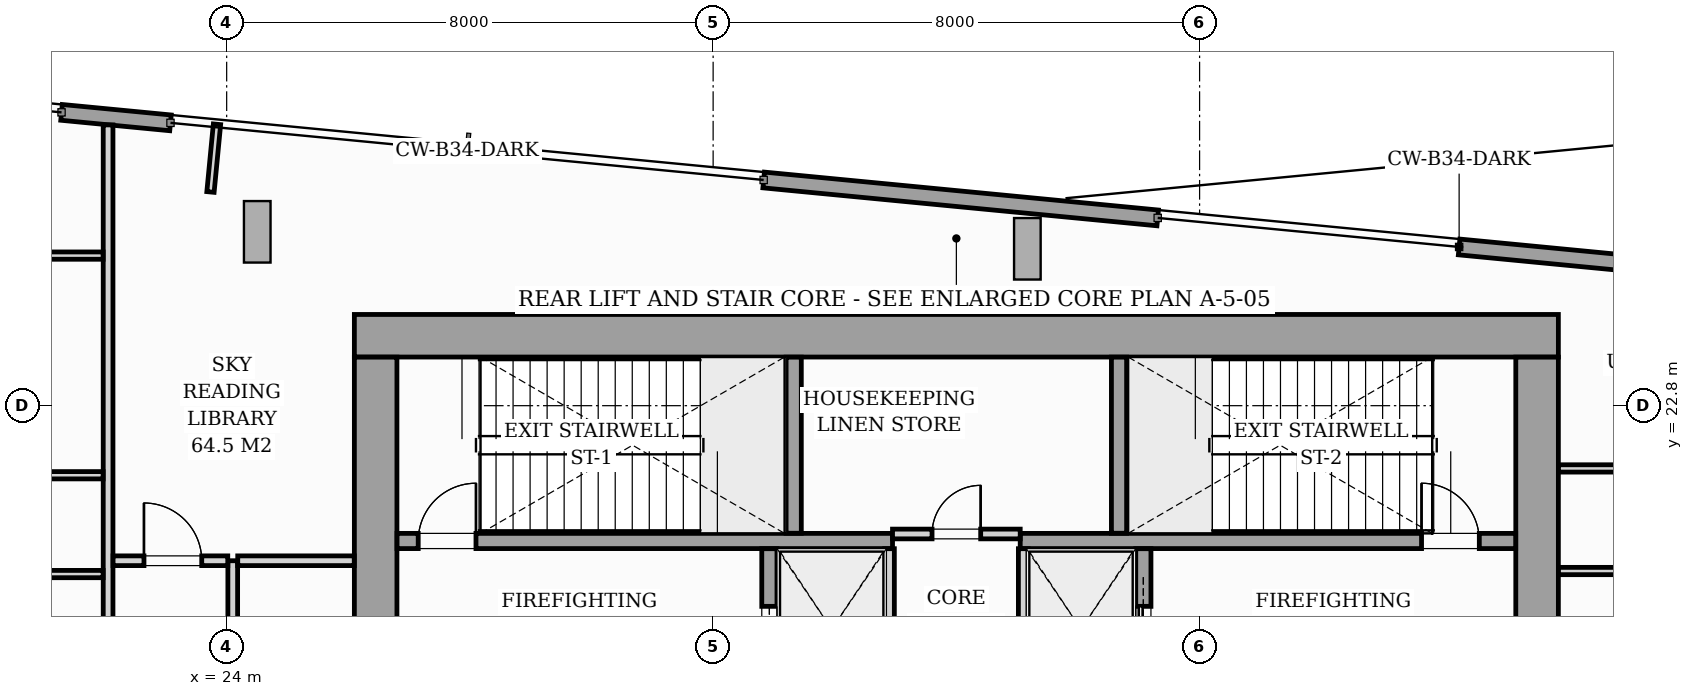
"""IFC4 building model, lengths in metres.
Left out: names, types, materials, properties, quantities, classifications, styles, units other than length and angle.
Written with IfcOpenShell. Run it as: python <this file> out.ifc"""

import sys

from ifc_helpers import new_model, si_unit, direction, frame, frame_2d, origin, origin_2d, place, context, subcontext, project, spatial, rectangle, i_section, extrude, source, transform, mapped, element, fill, save


model = new_model("IFC4")
c1 = context("Model", 3, precision=1e-05, world=origin(), true_north=direction((0.0, 1.0)))
c2 = subcontext(c1, "Body", "Model", "MODEL_VIEW")
j1 = project(units=[si_unit("LENGTHUNIT", "METRE"), si_unit("PLANEANGLEUNIT", "RADIAN")], contexts=[c1])
p1 = place(None, origin())
s1 = spatial("IfcSite", under=j1, at=p1, CompositionType="ELEMENT")
p2 = place(p1, origin())
s2 = spatial("IfcBuilding", under=s1, at=p2, CompositionType="ELEMENT")
p3 = place(p2, frame((0.0, 0.0, 119.4)))
s3 = spatial("IfcBuildingStorey", under=s2, at=p3, CompositionType="ELEMENT", Elevation=119.4)
m1 = source(origin(), c2, "Body", "SweptSolid", [
    extrude(i_section(OverallWidth=0.421, OverallDepth=0.465, WebThickness=0.045, FlangeThickness=0.073, FilletRadius=0.018, at=origin_2d()), origin(), (0.0, 0.0, 1.0), 5.196),
])
for number, where, z_axis, x_axis in (
    (1, (26.4, 24.0, 0.002), (0.0, 0.0, 1.0), (1.0, 0.0, 0.0)),
    (2, (33.12, 24.0, 0.002), (0.0, 0.0, 1.0), (1.0, 0.0, 0.0)),
    (3, (38.88, 24.0, 0.002), (0.0, 0.0, 1.0), (1.0, 0.0, 0.0)),
    (4, (45.6, 24.0, 0.002), (0.0, 0.0, 1.0), (1.0, 0.0, 0.0)),
):
    element("IfcColumn", number, at=place(p3, frame(where, z_axis=z_axis, x_axis=x_axis)), inside=s3, PredefinedType="PILASTER", context=c2, shape_type="MappedRepresentation", body=[
        mapped(m1, transform((0.0, 0.0, 0.0), scale=1.0)),
    ])
m2 = source(origin(), c2, "Body", "SweptSolid", [
    extrude(i_section(OverallWidth=0.438, OverallDepth=1.011, WebThickness=0.041, FlangeThickness=0.074, FilletRadius=0.024, at=origin_2d()), origin(), (0.0, 0.0, 1.0), 5.536),
])
p4 = place(p3, frame((25.221, 25.412, 0.139), z_axis=(-0.550407983816, 0.189202744437, 0.813174872244), x_axis=(0.769008579573, -0.264346699228, 0.582019438809)))
e5 = element("IfcColumn", 5, at=p4, inside=s3, PredefinedType="COLUMN", context=c2, shape_type="MappedRepresentation", body=[
    mapped(m2, transform((0.0, 0.0, 0.0), scale=1.0)),
])
m3 = source(origin(), c2, "Body", "SweptSolid", [
    extrude(i_section(OverallWidth=0.438, OverallDepth=1.011, WebThickness=0.041, FlangeThickness=0.074, FilletRadius=0.024, at=origin_2d()), origin(), (0.0, 0.0, 1.0), 6.257),
])
p5 = place(p3, frame((38.191, 25.38, 0.166), z_axis=(-0.703272609658, 7.8037351e-05, 0.710920270083), x_axis=(0.710920265706, -7.8885959e-05, 0.703272613988)))
e6 = element("IfcColumn", 6, at=p5, inside=s3, PredefinedType="COLUMN", context=c2, shape_type="MappedRepresentation", body=[
    mapped(m3, transform((0.0, 0.0, 0.0), scale=1.0)),
])
m4 = source(origin(), c2, "Body", "SweptSolid", [
    extrude(i_section(OverallWidth=0.438, OverallDepth=1.011, WebThickness=0.041, FlangeThickness=0.074, FilletRadius=0.024, at=origin_2d()), origin(), (0.0, 0.0, 1.0), 7.288),
])
p6 = place(p3, frame((51.152, 26.298, 0.186), z_axis=(-0.787175284288, -0.120828173558, 0.604777334463), x_axis=(0.597776232885, 0.091756196945, 0.796394610554)))
e7 = element("IfcColumn", 7, at=p6, inside=s3, PredefinedType="COLUMN", context=c2, shape_type="MappedRepresentation", body=[
    mapped(m4, transform((0.0, 0.0, 0.0), scale=1.0)),
])
p7 = place(p3, frame((21.284, 27.624, 0.0), z_axis=(0.0, 0.0, 1.0), x_axis=(0.995391866735, -0.09589072759, 0.0)))
e8 = element("IfcWall", 8, at=p7, inside=s3, PredefinedType="STANDARD", context=c2, shape_type="SweptSolid", body=[
    extrude(rectangle(XDim=1.8, YDim=0.26, at=frame_2d((0.9, 0.0))), origin(), (0.0, 0.0, 1.0), 4.78),
])
p8 = place(p3, frame((32.831, 26.512, 0.0), z_axis=(0.0, 0.0, 1.0), x_axis=(0.995395138946, -0.095856754395, 0.0)))
e9 = element("IfcWall", 9, at=p8, inside=s3, PredefinedType="STANDARD", context=c2, shape_type="SweptSolid", body=[
    extrude(rectangle(XDim=6.51, YDim=0.26, at=frame_2d((3.255, 0.0))), origin(), (0.0, 0.0, 1.0), 4.78),
])
p9 = place(p3, frame((44.268, 25.41, 0.0), z_axis=(0.0, 0.0, 1.0), x_axis=(0.995396292684, -0.095844772998, 0.0)))
e10 = element("IfcWall", 10, at=p9, inside=s3, PredefinedType="STANDARD", context=c2, shape_type="SweptSolid", body=[
    extrude(rectangle(XDim=4.85, YDim=0.26, at=frame_2d((2.425, 0.0))), origin(), (0.0, 0.0, 1.0), 4.78),
])
p10 = place(p3, frame((26.1, 23.95, 0.0), z_axis=(0.0, 0.0, 1.0), x_axis=(1.0, 0.0, 0.0)))
e11 = element("IfcWall", 11, at=p10, inside=s3, PredefinedType="SHEAR", context=c2, shape_type="SweptSolid", body=[
    extrude(rectangle(XDim=19.8, YDim=0.7, at=frame_2d((9.9, 0.0))), origin(), (0.0, 0.0, 1.0), 5.2),
])
for number, where, z_axis, x_axis in (
    (12, (26.45, 17.802, 0.0), (0.0, 0.0, 1.0), (0.0, 1.0, 0.0)),
    (13, (45.55, 17.802, 0.0), (0.0, 0.0, 1.0), (0.0, 1.0, 0.0)),
):
    element("IfcWall", number, at=place(p3, frame(where, z_axis=z_axis, x_axis=x_axis)), inside=s3, PredefinedType="SHEAR", context=c2, shape_type="SweptSolid", body=[
        extrude(rectangle(XDim=5.796, YDim=0.7, at=frame_2d((2.898, 0.0))), origin(), (0.0, 0.0, 1.0), 5.2),
    ])
p11 = place(p3, frame((26.802, 20.575, 0.0), z_axis=(0.0, 0.0, 1.0), x_axis=(1.0, 0.0, 0.0)))
e14 = element("IfcWall", 14, at=p11, inside=s3, PredefinedType="SOLIDWALL", context=c2, shape_type="SweptSolid", body=[
    extrude(rectangle(XDim=8.148, YDim=0.25, at=frame_2d((4.074, 0.0))), origin(), (0.0, 0.0, 1.0), 5.2),
])
p12 = place(p11, frame((0.348, 0.0, 0.0)))
e15 = element("IfcOpeningElement", 15, at=p12, cuts=e14, PredefinedType="OPENING", context=c2, shape_type="SweptSolid", body=[
    extrude(rectangle(XDim=0.95, YDim=2.06, at=frame_2d((0.475, 1.03))), frame((0.0, 0.135, 0.0), z_axis=(0.0, -1.0, 0.0), x_axis=(1.0, 0.0, 0.0)), (0.0, 0.0, 1.0), 0.27),
])
p13 = place(p3, frame((37.05, 20.575, 0.0), z_axis=(0.0, 0.0, 1.0), x_axis=(1.0, 0.0, 0.0)))
e16 = element("IfcWall", 16, at=p13, inside=s3, PredefinedType="SOLIDWALL", context=c2, shape_type="SweptSolid", body=[
    extrude(rectangle(XDim=8.148, YDim=0.25, at=frame_2d((4.074, 0.0))), origin(), (0.0, 0.0, 1.0), 5.2),
])
p14 = place(p13, frame((6.6, 0.0, 0.0)))
e17 = element("IfcOpeningElement", 17, at=p14, cuts=e16, PredefinedType="OPENING", context=c2, shape_type="SweptSolid", body=[
    extrude(rectangle(XDim=0.95, YDim=2.06, at=frame_2d((0.475, 1.03))), frame((0.0, 0.135, 0.0), z_axis=(0.0, -1.0, 0.0), x_axis=(1.0, 0.0, 0.0)), (0.0, 0.0, 1.0), 0.27),
])
for number, where, z_axis, x_axis in (
    (18, (33.325, 20.702, 0.0), (0.0, 0.0, 1.0), (0.0, 1.0, 0.0)),
    (19, (38.675, 20.702, 0.0), (0.0, 0.0, 1.0), (0.0, 1.0, 0.0)),
):
    element("IfcWall", number, at=place(p3, frame(where, z_axis=z_axis, x_axis=x_axis)), inside=s3, PredefinedType="SOLIDWALL", context=c2, shape_type="SweptSolid", body=[
        extrude(rectangle(XDim=2.896, YDim=0.25, at=frame_2d((1.448, 0.0))), origin(), (0.0, 0.0, 1.0), 5.2),
    ])
p15 = place(p3, frame((32.925, 17.802, 0.0), z_axis=(0.0, 0.0, 1.0), x_axis=(0.0, 1.0, 0.0)))
e20 = element("IfcWall", 20, at=p15, inside=s3, PredefinedType="SOLIDWALL", context=c2, shape_type="SweptSolid", body=[
    extrude(rectangle(XDim=2.646, YDim=0.25, at=frame_2d((1.323, 0.0))), origin(), (0.0, 0.0, 1.0), 5.2),
])
p16 = place(p15, frame((0.598, 0.0, 0.0)))
e21 = element("IfcOpeningElement", 21, at=p16, cuts=e20, PredefinedType="OPENING", context=c2, shape_type="SweptSolid", body=[
    extrude(rectangle(XDim=1.1, YDim=2.08, at=frame_2d((0.55, 1.04))), frame((0.0, 0.135, 0.0), z_axis=(0.0, -1.0, 0.0), x_axis=(1.0, 0.0, 0.0)), (0.0, 0.0, 1.0), 0.27),
])
for number, where, z_axis, x_axis in (
    (22, (34.9, 17.802, 0.0), (0.0, 0.0, 1.0), (0.0, 1.0, 0.0)),
    (23, (37.1, 17.802, 0.0), (0.0, 0.0, 1.0), (0.0, 1.0, 0.0)),
):
    element("IfcWall", number, at=place(p3, frame(where, z_axis=z_axis, x_axis=x_axis)), inside=s3, PredefinedType="PARTITIONING", context=c2, shape_type="SweptSolid", body=[
        extrude(rectangle(XDim=2.646, YDim=0.16, at=frame_2d((1.323, 0.0))), origin(), (0.0, 0.0, 1.0), 4.78),
    ])
p17 = place(p3, frame((39.075, 17.802, 0.0), z_axis=(0.0, 0.0, 1.0), x_axis=(0.0, 1.0, 0.0)))
e24 = element("IfcWall", 24, at=p17, inside=s3, PredefinedType="SOLIDWALL", context=c2, shape_type="SweptSolid", body=[
    extrude(rectangle(XDim=2.646, YDim=0.25, at=frame_2d((1.323, 0.0))), origin(), (0.0, 0.0, 1.0), 5.2),
])
p18 = place(p17, frame((0.598, 0.0, 0.0)))
e25 = element("IfcOpeningElement", 25, at=p18, cuts=e24, PredefinedType="OPENING", context=c2, shape_type="SweptSolid", body=[
    extrude(rectangle(XDim=1.1, YDim=2.08, at=frame_2d((0.55, 1.04))), frame((0.0, 0.135, 0.0), z_axis=(0.0, -1.0, 0.0), x_axis=(1.0, 0.0, 0.0)), (0.0, 0.0, 1.0), 0.27),
])
p19 = place(p3, frame((34.95, 20.69, 0.0), z_axis=(0.0, 0.0, 1.0), x_axis=(1.0, 0.0, 0.0)))
e26 = element("IfcWall", 26, at=p19, inside=s3, PredefinedType="PARTITIONING", context=c2, shape_type="SweptSolid", body=[
    extrude(rectangle(XDim=2.1, YDim=0.16, at=frame_2d((1.05, 0.0))), origin(), (0.0, 0.0, 1.0), 4.78),
])
p20 = place(p19, frame((0.65, 0.0, 0.0)))
e27 = element("IfcOpeningElement", 27, at=p20, cuts=e26, PredefinedType="OPENING", context=c2, shape_type="SweptSolid", body=[
    extrude(rectangle(XDim=0.8, YDim=2.05, at=frame_2d((0.4, 1.025))), frame((0.0, 0.09, 0.0), z_axis=(0.0, -1.0, 0.0), x_axis=(1.0, 0.0, 0.0)), (0.0, 0.0, 1.0), 0.18),
])
p21 = place(p3, frame((22.05, 12.632, 0.0), z_axis=(0.0, 0.0, 1.0), x_axis=(0.0, 1.0, 0.0)))
e28 = element("IfcWall", 28, at=p21, inside=s3, PredefinedType="PARTITIONING", context=c2, shape_type="SweptSolid", body=[
    extrude(rectangle(XDim=14.785, YDim=0.16, at=frame_2d((7.393, 0.0))), origin(), (0.0, 0.0, 1.0), 4.78),
])
p22 = place(p21, frame((0.493, 0.0, 0.0)))
e29 = element("IfcOpeningElement", 29, at=p22, cuts=e28, PredefinedType="OPENING", context=c2, shape_type="SweptSolid", body=[
    extrude(rectangle(XDim=0.95, YDim=2.06, at=frame_2d((0.475, 1.03))), frame((0.0, 0.09, 0.0), z_axis=(0.0, -1.0, 0.0), x_axis=(1.0, 0.0, 0.0)), (0.0, 0.0, 1.0), 0.18),
])
p23 = place(p3, frame((6.772, 25.268, 0.0), z_axis=(0.0, 0.0, 1.0), x_axis=(1.0, 0.0, 0.0)))
e30 = element("IfcWall", 30, at=p23, inside=s3, PredefinedType="PARTITIONING", context=c2, shape_type="SweptSolid", body=[
    extrude(rectangle(XDim=15.196, YDim=0.12, at=frame_2d((7.598, 0.0))), origin(), (0.0, 0.0, 1.0), 4.78),
])
p24 = place(p23, frame((8.536, 0.0, 0.0)))
e31 = element("IfcOpeningElement", 31, at=p24, cuts=e30, PredefinedType="OPENING", context=c2, shape_type="SweptSolid", body=[
    extrude(rectangle(XDim=0.85, YDim=2.05, at=frame_2d((0.425, 1.025))), frame((0.0, 0.07, 0.0), z_axis=(0.0, -1.0, 0.0), x_axis=(1.0, 0.0, 0.0)), (0.0, 0.0, 1.0), 0.14),
])
p25 = place(p3, frame((6.424, 21.656, 0.0), z_axis=(0.0, 0.0, 1.0), x_axis=(1.0, 0.0, 0.0)))
e32 = element("IfcWall", 32, at=p25, inside=s3, PredefinedType="PARTITIONING", context=c2, shape_type="SweptSolid", body=[
    extrude(rectangle(XDim=15.544, YDim=0.12, at=frame_2d((7.772, 0.0))), origin(), (0.0, 0.0, 1.0), 4.78),
])
p26 = place(p25, frame((9.422, 0.0, 0.0)))
e33 = element("IfcOpeningElement", 33, at=p26, cuts=e32, PredefinedType="OPENING", context=c2, shape_type="SweptSolid", body=[
    extrude(rectangle(XDim=0.85, YDim=2.05, at=frame_2d((0.425, 1.025))), frame((0.0, 0.07, 0.0), z_axis=(0.0, -1.0, 0.0), x_axis=(1.0, 0.0, 0.0)), (0.0, 0.0, 1.0), 0.14),
])
p27 = place(p3, frame((6.45, 20.031, 0.0), z_axis=(0.0, 0.0, 1.0), x_axis=(1.0, 0.0, 0.0)))
e34 = element("IfcWall", 34, at=p27, inside=s3, PredefinedType="PARTITIONING", context=c2, shape_type="SweptSolid", body=[
    extrude(rectangle(XDim=15.518, YDim=0.12, at=frame_2d((7.759, 0.0))), origin(), (0.0, 0.0, 1.0), 4.78),
])
p28 = place(p27, frame((9.396, 0.0, 0.0)))
e35 = element("IfcOpeningElement", 35, at=p28, cuts=e34, PredefinedType="OPENING", context=c2, shape_type="SweptSolid", body=[
    extrude(rectangle(XDim=0.85, YDim=2.05, at=frame_2d((0.425, 1.025))), frame((0.0, 0.07, 0.0), z_axis=(0.0, -1.0, 0.0), x_axis=(1.0, 0.0, 0.0)), (0.0, 0.0, 1.0), 0.14),
])
p29 = place(p3, frame((45.902, 21.768, 0.0), z_axis=(0.0, 0.0, 1.0), x_axis=(1.0, 0.0, 0.0)))
e36 = element("IfcWall", 36, at=p29, inside=s3, PredefinedType="PARTITIONING", context=c2, shape_type="SweptSolid", body=[
    extrude(rectangle(XDim=6.509, YDim=0.12, at=frame_2d((3.254, 0.0))), origin(), (0.0, 0.0, 1.0), 4.78),
])
p30 = place(p29, frame((2.889, 0.0, 0.0)))
e37 = element("IfcOpeningElement", 37, at=p30, cuts=e36, PredefinedType="OPENING", context=c2, shape_type="SweptSolid", body=[
    extrude(rectangle(XDim=0.85, YDim=2.05, at=frame_2d((0.425, 1.025))), frame((0.0, 0.07, 0.0), z_axis=(0.0, -1.0, 0.0), x_axis=(1.0, 0.0, 0.0)), (0.0, 0.0, 1.0), 0.14),
])
p31 = place(p3, frame((45.902, 20.081, 0.0), z_axis=(0.0, 0.0, 1.0), x_axis=(1.0, 0.0, 0.0)))
e38 = element("IfcWall", 38, at=p31, inside=s3, PredefinedType="PARTITIONING", context=c2, shape_type="SweptSolid", body=[
    extrude(rectangle(XDim=13.875, YDim=0.12, at=frame_2d((6.937, 0.0))), origin(), (0.0, 0.0, 1.0), 4.78),
])
p32 = place(p31, frame((6.708, 0.0, 0.0)))
e39 = element("IfcOpeningElement", 39, at=p32, cuts=e38, PredefinedType="OPENING", context=c2, shape_type="SweptSolid", body=[
    extrude(rectangle(XDim=0.85, YDim=2.05, at=frame_2d((0.425, 1.025))), frame((0.0, 0.07, 0.0), z_axis=(0.0, -1.0, 0.0), x_axis=(1.0, 0.0, 0.0)), (0.0, 0.0, 1.0), 0.14),
])
p33 = place(p3, frame((24.1, 14.66, 0.0), z_axis=(0.0, 0.0, 1.0), x_axis=(0.0, 1.0, 0.0)))
e40 = element("IfcWall", 40, at=p33, inside=s3, PredefinedType="PARTITIONING", context=c2, shape_type="SweptSolid", body=[
    extrude(rectangle(XDim=5.59, YDim=0.16, at=frame_2d((2.795, 0.0))), origin(), (0.0, 0.0, 1.0), 4.78),
])
p34 = place(p33, frame((2.385, 0.0, 0.0)))
e41 = element("IfcOpeningElement", 41, at=p34, cuts=e40, PredefinedType="OPENING", context=c2, shape_type="SweptSolid", body=[
    extrude(rectangle(XDim=0.9, YDim=2.05, at=frame_2d((0.45, 1.025))), frame((0.0, 0.09, 0.0), z_axis=(0.0, -1.0, 0.0), x_axis=(1.0, 0.0, 0.0)), (0.0, 0.0, 1.0), 0.18),
])
p35 = place(p3, frame((22.132, 20.25, 0.0), z_axis=(0.0, 0.0, 1.0), x_axis=(1.0, 0.0, 0.0)))
e42 = element("IfcWall", 42, at=p35, inside=s3, PredefinedType="PARTITIONING", context=c2, shape_type="SweptSolid", body=[
    extrude(rectangle(XDim=1.886, YDim=0.16, at=frame_2d((0.943, 0.0))), origin(), (0.0, 0.0, 1.0), 4.78),
])
p36 = place(p35, frame((0.508, 0.0, 0.0)))
e43 = element("IfcOpeningElement", 43, at=p36, cuts=e42, PredefinedType="OPENING", context=c2, shape_type="SweptSolid", body=[
    extrude(rectangle(XDim=0.95, YDim=2.06, at=frame_2d((0.475, 1.03))), frame((0.0, 0.09, 0.0), z_axis=(0.0, -1.0, 0.0), x_axis=(1.0, 0.0, 0.0)), (0.0, 0.0, 1.0), 0.18),
])
p37 = place(p3, frame((24.182, 20.25, 0.0), z_axis=(0.0, 0.0, 1.0), x_axis=(1.0, 0.0, 0.0)))
e44 = element("IfcWall", 44, at=p37, inside=s3, PredefinedType="PARTITIONING", context=c2, shape_type="SweptSolid", body=[
    extrude(rectangle(XDim=1.916, YDim=0.16, at=frame_2d((0.958, 0.0))), origin(), (0.0, 0.0, 1.0), 4.78),
])
p38 = place(p3, frame((23.734, 26.314, 0.0), z_axis=(0.0, 0.0, 1.0), x_axis=(0.095828869448, 0.995397823878, 0.0)))
e45 = element("IfcWall", 45, at=p38, inside=s3, PredefinedType="PARTITIONING", context=c2, shape_type="SweptSolid", body=[
    extrude(rectangle(XDim=1.118, YDim=0.12, at=frame_2d((0.559, 0.0))), origin(), (0.0, 0.0, 1.0), 4.78),
])
m5 = source(origin(), c2, "Body", "SweptSolid", [
    extrude(rectangle(XDim=0.95, YDim=2.06, at=frame_2d((0.475, 1.03))), frame((0.0, 0.025, 0.0), z_axis=(0.0, -1.0, 0.0), x_axis=(1.0, 0.0, 0.0)), (0.0, 0.0, 1.0), 0.05),
])
p39 = place(p12, origin())
e46 = element("IfcDoor", 46, at=p39, inside=s3, OperationType="SINGLE_SWING_RIGHT", PredefinedType="DOOR", context=c2, shape_type="MappedRepresentation", body=[
    mapped(m5, transform((0.0, 0.0, 0.0), scale=1.0)),
])
fill(e15, e46)
p40 = place(p14, origin())
e47 = element("IfcDoor", 47, at=p40, inside=s3, OperationType="SINGLE_SWING_LEFT", PredefinedType="DOOR", context=c2, shape_type="MappedRepresentation", body=[
    mapped(m5, transform((0.0, 0.0, 0.0), scale=1.0)),
])
fill(e17, e47)
m6 = source(origin(), c2, "Body", "SweptSolid", [
    extrude(rectangle(XDim=1.1, YDim=2.08, at=frame_2d((0.55, 1.04))), frame((0.0, 0.025, 0.0), z_axis=(0.0, -1.0, 0.0), x_axis=(1.0, 0.0, 0.0)), (0.0, 0.0, 1.0), 0.05),
])
p41 = place(p16, origin())
e48 = element("IfcDoor", 48, at=p41, inside=s3, OperationType="SLIDING_TO_LEFT", PredefinedType="DOOR", context=c2, shape_type="MappedRepresentation", body=[
    mapped(m6, transform((0.0, 0.0, 0.0), scale=1.0)),
])
fill(e21, e48)
p42 = place(p18, origin())
e49 = element("IfcDoor", 49, at=p42, inside=s3, OperationType="SLIDING_TO_RIGHT", PredefinedType="DOOR", context=c2, shape_type="MappedRepresentation", body=[
    mapped(m6, transform((0.0, 0.0, 0.0), scale=1.0)),
])
fill(e25, e49)
m7 = source(origin(), c2, "Body", "SweptSolid", [
    extrude(rectangle(XDim=0.8, YDim=2.05, at=frame_2d((0.4, 1.025))), frame((0.0, 0.025, 0.0), z_axis=(0.0, -1.0, 0.0), x_axis=(1.0, 0.0, 0.0)), (0.0, 0.0, 1.0), 0.05),
])
p43 = place(p20, origin())
e50 = element("IfcDoor", 50, at=p43, inside=s3, OperationType="SINGLE_SWING_RIGHT", PredefinedType="DOOR", context=c2, shape_type="MappedRepresentation", body=[
    mapped(m7, transform((0.0, 0.0, 0.0), scale=1.0)),
])
fill(e27, e50)
m8 = source(origin(), c2, "Body", "SweptSolid", [
    extrude(rectangle(XDim=0.95, YDim=2.06, at=frame_2d((0.475, 1.03))), frame((0.0, 0.025, 0.0), z_axis=(0.0, -1.0, 0.0), x_axis=(1.0, 0.0, 0.0)), (0.0, 0.0, 1.0), 0.05),
])
p44 = place(p36, origin())
e51 = element("IfcDoor", 51, at=p44, inside=s3, OperationType="SINGLE_SWING_LEFT", PredefinedType="DOOR", context=c2, shape_type="MappedRepresentation", body=[
    mapped(m8, transform((0.0, 0.0, 0.0), scale=1.0)),
])
fill(e43, e51)
save(model, sys.argv[1])
